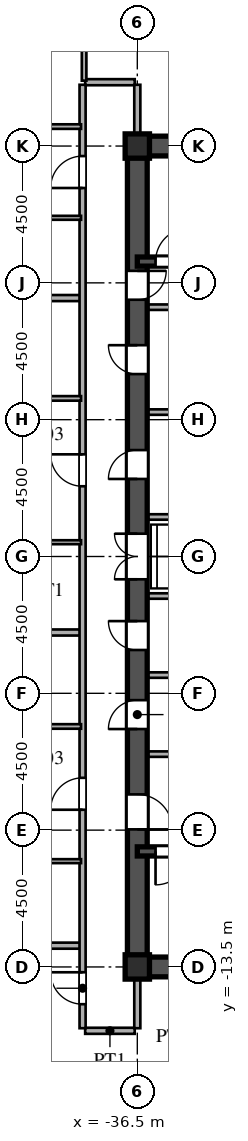
"""IFC4 building model, lengths in metres.
Left out: names, types, materials, properties, quantities, classifications, styles, units other than length and angle.
Written with IfcOpenShell. Run it as: python <this file> out.ifc"""

import sys

from ifc_helpers import new_model, si_unit, direction, frame, frame_2d, origin, origin_2d, place, context, subcontext, project, spatial, rectangle, i_section, extrude, source, transform, mapped, element, fill, save


model = new_model("IFC4")
c1 = context("Model", 3, precision=1e-05, world=origin(), true_north=direction((0.0, 1.0)))
c2 = subcontext(c1, "Body", "Model", "MODEL_VIEW")
j1 = project(units=[si_unit("LENGTHUNIT", "METRE"), si_unit("PLANEANGLEUNIT", "RADIAN")], contexts=[c1])
p1 = place(None, origin())
s1 = spatial("IfcSite", under=j1, at=p1, CompositionType="ELEMENT")
p2 = place(p1, origin())
s2 = spatial("IfcBuilding", under=s1, at=p2, CompositionType="ELEMENT")
p3 = place(p2, frame((0.0, 0.0, 96.0)))
s3 = spatial("IfcBuildingStorey", under=s2, at=p3, CompositionType="ELEMENT", Elevation=96.0)
m1 = source(origin(), c2, "Body", "SweptSolid", [
    extrude(i_section(OverallWidth=0.8, OverallDepth=0.8, WebThickness=0.032, FlangeThickness=0.05, at=origin_2d()), origin(), (0.0, 0.0, 1.0), 3.6),
])
for number, where, z_axis, x_axis in (
    (1, (-36.5, -13.5, 0.0), (0.0, 0.0, 1.0), (1.0, 0.0, 0.0)),
    (2, (-36.5, 13.5, 0.0), (0.0, 0.0, 1.0), (1.0, 0.0, 0.0)),
):
    element("IfcColumn", number, at=place(p3, frame(where, z_axis=z_axis, x_axis=x_axis)), inside=s3, PredefinedType="COLUMN", context=c2, shape_type="MappedRepresentation", body=[
        mapped(m1, transform((0.0, 0.0, 0.0), scale=1.0)),
    ])
for number, where, z_axis, x_axis in (
    (3, (-36.5, -13.5, 0.0), (0.0, 0.0, 1.0), (1.0, 0.0, 0.0)),
    (4, (-36.5, 13.5, 0.0), (0.0, 0.0, 1.0), (1.0, 0.0, 0.0)),
):
    element("IfcWall", number, at=place(p3, frame(where, z_axis=z_axis, x_axis=x_axis)), inside=s3, PredefinedType="SHEAR", context=c2, shape_type="SweptSolid", body=[
        extrude(rectangle(XDim=9.0, YDim=0.65, at=frame_2d((4.5, 0.0))), origin(), (0.0, 0.0, 1.0), 3.38),
    ])
p4 = place(p3, frame((-36.5, -13.65, 0.0), z_axis=(0.0, 0.0, 1.0), x_axis=(0.0, 1.0, 0.0)))
e5 = element("IfcWall", 5, at=p4, inside=s3, PredefinedType="SHEAR", context=c2, shape_type="SweptSolid", body=[
    extrude(rectangle(XDim=7.15, YDim=0.65, at=frame_2d((3.575, 0.0))), origin(), (0.0, 0.0, 1.0), 3.38),
])
p5 = place(p4, frame((4.675, 0.0, 0.0)))
e6 = element("IfcOpeningElement", 6, at=p5, cuts=e5, PredefinedType="OPENING", context=c2, shape_type="SweptSolid", body=[
    extrude(rectangle(XDim=1.15, YDim=2.2, at=frame_2d((0.575, 1.1))), frame((0.0, 0.335, 0.0), z_axis=(0.0, -1.0, 0.0), x_axis=(1.0, 0.0, 0.0)), (0.0, 0.0, 1.0), 0.67),
])
p6 = place(p3, frame((-36.5, -1.3, 0.0), z_axis=(0.0, 0.0, 1.0), x_axis=(0.0, 1.0, 0.0)))
e7 = element("IfcWall", 7, at=p6, inside=s3, PredefinedType="SHEAR", context=c2, shape_type="SweptSolid", body=[
    extrude(rectangle(XDim=2.6, YDim=0.65, at=frame_2d((1.3, 0.0))), origin(), (0.0, 0.0, 1.0), 3.38),
])
p7 = place(p6, frame((0.55, 0.0, 0.0)))
e8 = element("IfcOpeningElement", 8, at=p7, cuts=e7, PredefinedType="OPENING", context=c2, shape_type="SweptSolid", body=[
    extrude(rectangle(XDim=1.5, YDim=2.3, at=frame_2d((0.75, 1.15))), frame((0.0, 0.335, 0.0), z_axis=(0.0, -1.0, 0.0), x_axis=(1.0, 0.0, 0.0)), (0.0, 0.0, 1.0), 0.67),
])
p8 = place(p3, frame((-36.5, 8.2, 0.0), z_axis=(0.0, 0.0, 1.0), x_axis=(0.0, 1.0, 0.0)))
e9 = element("IfcWall", 9, at=p8, inside=s3, PredefinedType="SHEAR", context=c2, shape_type="SweptSolid", body=[
    extrude(rectangle(XDim=5.45, YDim=0.65, at=frame_2d((2.725, 0.0))), origin(), (0.0, 0.0, 1.0), 3.38),
])
p9 = place(p8, frame((0.245, 0.0, 0.0)))
e10 = element("IfcOpeningElement", 10, at=p9, cuts=e9, PredefinedType="OPENING", context=c2, shape_type="SweptSolid", body=[
    extrude(rectangle(XDim=0.95, YDim=2.15, at=frame_2d((0.475, 1.075))), frame((0.0, 0.335, 0.0), z_axis=(0.0, -1.0, 0.0), x_axis=(1.0, 0.0, 0.0)), (0.0, 0.0, 1.0), 0.67),
])
p10 = place(p3, frame((-36.5, -6.5, 0.0), z_axis=(0.0, 0.0, 1.0), x_axis=(0.0, 1.0, 0.0)))
e11 = element("IfcWall", 11, at=p10, inside=s3, PredefinedType="SHEAR", context=c2, shape_type="SweptSolid", body=[
    extrude(rectangle(XDim=2.6, YDim=0.65, at=frame_2d((1.3, 0.0))), origin(), (0.0, 0.0, 1.0), 3.38),
])
p11 = place(p10, frame((0.825, 0.0, 0.0)))
e12 = element("IfcOpeningElement", 12, at=p11, cuts=e11, PredefinedType="OPENING", context=c2, shape_type="SweptSolid", body=[
    extrude(rectangle(XDim=0.95, YDim=2.15, at=frame_2d((0.475, 1.075))), frame((0.0, 0.335, 0.0), z_axis=(0.0, -1.0, 0.0), x_axis=(1.0, 0.0, 0.0)), (0.0, 0.0, 1.0), 0.67),
])
p12 = place(p3, frame((-36.5, -3.9, 0.0), z_axis=(0.0, 0.0, 1.0), x_axis=(0.0, 1.0, 0.0)))
e13 = element("IfcWall", 13, at=p12, inside=s3, PredefinedType="SHEAR", context=c2, shape_type="SweptSolid", body=[
    extrude(rectangle(XDim=2.6, YDim=0.65, at=frame_2d((1.3, 0.0))), origin(), (0.0, 0.0, 1.0), 3.38),
])
p13 = place(p12, frame((0.825, 0.0, 0.0)))
e14 = element("IfcOpeningElement", 14, at=p13, cuts=e13, PredefinedType="OPENING", context=c2, shape_type="SweptSolid", body=[
    extrude(rectangle(XDim=0.95, YDim=2.15, at=frame_2d((0.475, 1.075))), frame((0.0, 0.335, 0.0), z_axis=(0.0, -1.0, 0.0), x_axis=(1.0, 0.0, 0.0)), (0.0, 0.0, 1.0), 0.67),
])
p14 = place(p3, frame((-36.5, 1.3, 0.0), z_axis=(0.0, 0.0, 1.0), x_axis=(0.0, 1.0, 0.0)))
e15 = element("IfcWall", 15, at=p14, inside=s3, PredefinedType="SHEAR", context=c2, shape_type="SweptSolid", body=[
    extrude(rectangle(XDim=3.45, YDim=0.65, at=frame_2d((1.725, 0.0))), origin(), (0.0, 0.0, 1.0), 3.38),
])
p15 = place(p14, frame((1.25, 0.0, 0.0)))
e16 = element("IfcOpeningElement", 16, at=p15, cuts=e15, PredefinedType="OPENING", context=c2, shape_type="SweptSolid", body=[
    extrude(rectangle(XDim=0.95, YDim=2.15, at=frame_2d((0.475, 1.075))), frame((0.0, 0.335, 0.0), z_axis=(0.0, -1.0, 0.0), x_axis=(1.0, 0.0, 0.0)), (0.0, 0.0, 1.0), 0.67),
])
p16 = place(p3, frame((-36.5, 4.75, 0.0), z_axis=(0.0, 0.0, 1.0), x_axis=(0.0, 1.0, 0.0)))
e17 = element("IfcWall", 17, at=p16, inside=s3, PredefinedType="SHEAR", context=c2, shape_type="SweptSolid", body=[
    extrude(rectangle(XDim=3.45, YDim=0.65, at=frame_2d((1.725, 0.0))), origin(), (0.0, 0.0, 1.0), 3.38),
])
p17 = place(p16, frame((1.25, 0.0, 0.0)))
e18 = element("IfcOpeningElement", 18, at=p17, cuts=e17, PredefinedType="OPENING", context=c2, shape_type="SweptSolid", body=[
    extrude(rectangle(XDim=0.95, YDim=2.15, at=frame_2d((0.475, 1.075))), frame((0.0, 0.335, 0.0), z_axis=(0.0, -1.0, 0.0), x_axis=(1.0, 0.0, 0.0)), (0.0, 0.0, 1.0), 0.67),
])
p18 = place(p3, frame((-36.5, -9.7, 0.0), z_axis=(0.0, 0.0, 1.0), x_axis=(1.0, 0.0, 0.0)))
e19 = element("IfcWall", 19, at=p18, inside=s3, PredefinedType="SHEAR", context=c2, shape_type="SweptSolid", body=[
    extrude(rectangle(XDim=9.0, YDim=0.3, at=frame_2d((4.5, 0.0))), origin(), (0.0, 0.0, 1.0), 3.38),
])
p19 = place(p18, frame((0.6, 0.0, 0.0)))
e20 = element("IfcOpeningElement", 20, at=p19, cuts=e19, PredefinedType="OPENING", context=c2, shape_type="SweptSolid", body=[
    extrude(rectangle(XDim=1.1, YDim=2.2, at=frame_2d((0.55, 1.1))), frame((0.0, 0.16, 0.0), z_axis=(0.0, -1.0, 0.0), x_axis=(1.0, 0.0, 0.0)), (0.0, 0.0, 1.0), 0.32),
])
p20 = place(p3, frame((-36.5, 9.7, 0.0), z_axis=(0.0, 0.0, 1.0), x_axis=(1.0, 0.0, 0.0)))
e21 = element("IfcWall", 21, at=p20, inside=s3, PredefinedType="SHEAR", context=c2, shape_type="SweptSolid", body=[
    extrude(rectangle(XDim=9.0, YDim=0.3, at=frame_2d((4.5, 0.0))), origin(), (0.0, 0.0, 1.0), 3.38),
])
p21 = place(p20, frame((0.6, 0.0, 0.0)))
e22 = element("IfcOpeningElement", 22, at=p21, cuts=e21, PredefinedType="OPENING", context=c2, shape_type="SweptSolid", body=[
    extrude(rectangle(XDim=1.1, YDim=2.2, at=frame_2d((0.55, 1.1))), frame((0.0, 0.16, 0.0), z_axis=(0.0, -1.0, 0.0), x_axis=(1.0, 0.0, 0.0)), (0.0, 0.0, 1.0), 0.32),
])
for number, where, z_axis, x_axis in (
    (23, (-36.15, -6.5, 0.0), (0.0, 0.0, 1.0), (1.0, 0.0, 0.0)),
    (24, (-36.15, 8.2, 0.0), (0.0, 0.0, 1.0), (1.0, 0.0, 0.0)),
):
    element("IfcWall", number, at=place(p3, frame(where, z_axis=z_axis, x_axis=x_axis)), inside=s3, PredefinedType="PARTITIONING", context=c2, shape_type="SweptSolid", body=[
        extrude(rectangle(XDim=5.7, YDim=0.18, at=frame_2d((2.85, 0.0))), origin(), (0.0, 0.0, 1.0), 3.38),
    ])
for number, where, z_axis, x_axis in (
    (25, (-36.15, -1.3, 0.0), (0.0, 0.0, 1.0), (1.0, 0.0, 0.0)),
    (26, (-36.15, 1.3, 0.0), (0.0, 0.0, 1.0), (1.0, 0.0, 0.0)),
    (27, (-36.15, -3.9, 0.0), (0.0, 0.0, 1.0), (1.0, 0.0, 0.0)),
    (28, (-36.15, 4.75, 0.0), (0.0, 0.0, 1.0), (1.0, 0.0, 0.0)),
):
    element("IfcWall", number, at=place(p3, frame(where, z_axis=z_axis, x_axis=x_axis)), inside=s3, PredefinedType="PARTITIONING", context=c2, shape_type="SweptSolid", body=[
        extrude(rectangle(XDim=2.95, YDim=0.18, at=frame_2d((1.475, 0.0))), origin(), (0.0, 0.0, 1.0), 3.38),
    ])
p22 = place(p3, frame((-38.215, -15.6, 0.0), z_axis=(0.0, 0.0, 1.0), x_axis=(1.0, 0.0, 0.0)))
e29 = element("IfcWall", 29, at=p22, inside=s3, PredefinedType="PARTITIONING", context=c2, shape_type="SweptSolid", body=[
    extrude(rectangle(XDim=1.63, YDim=0.2, at=frame_2d((0.815, 0.0))), origin(), (0.0, 0.0, 1.0), 3.38),
])
p23 = place(p3, frame((-59.234, -12.8, 0.0), z_axis=(0.0, 0.0, 1.0), x_axis=(1.0, 0.0, 0.0)))
e30 = element("IfcWall", 30, at=p23, inside=s3, PredefinedType="PARTITIONING", context=c2, shape_type="SweptSolid", body=[
    extrude(rectangle(XDim=20.854, YDim=0.2, at=frame_2d((10.427, 0.0))), origin(), (0.0, 0.0, 1.0), 3.38),
])
p24 = place(p3, frame((-44.1, -10.02, 0.0), z_axis=(0.0, 0.0, 1.0), x_axis=(1.0, 0.0, 0.0)))
e31 = element("IfcWall", 31, at=p24, inside=s3, PredefinedType="PARTITIONING", context=c2, shape_type="SweptSolid", body=[
    extrude(rectangle(XDim=5.75, YDim=0.13, at=frame_2d((2.875, 0.0))), origin(), (0.0, 0.0, 1.0), 3.38),
])
p25 = place(p24, frame((2.435, 0.0, 0.0)))
e32 = element("IfcOpeningElement", 32, at=p25, cuts=e31, PredefinedType="OPENING", context=c2, shape_type="SweptSolid", body=[
    extrude(rectangle(XDim=0.88, YDim=2.1, at=frame_2d((0.44, 1.05))), frame((0.0, 0.075, 0.0), z_axis=(0.0, -1.0, 0.0), x_axis=(1.0, 0.0, 0.0)), (0.0, 0.0, 1.0), 0.15),
])
p26 = place(p3, frame((-44.1, -5.59, 0.0), z_axis=(0.0, 0.0, 1.0), x_axis=(1.0, 0.0, 0.0)))
e33 = element("IfcWall", 33, at=p26, inside=s3, PredefinedType="PARTITIONING", context=c2, shape_type="SweptSolid", body=[
    extrude(rectangle(XDim=5.75, YDim=0.15, at=frame_2d((2.875, 0.0))), origin(), (0.0, 0.0, 1.0), 3.38),
])
p27 = place(p26, frame((2.4, 0.0, 0.0)))
e34 = element("IfcOpeningElement", 34, at=p27, cuts=e33, PredefinedType="OPENING", context=c2, shape_type="SweptSolid", body=[
    extrude(rectangle(XDim=0.95, YDim=2.15, at=frame_2d((0.475, 1.075))), frame((0.0, 0.085, 0.0), z_axis=(0.0, -1.0, 0.0), x_axis=(1.0, 0.0, 0.0)), (0.0, 0.0, 1.0), 0.17),
])
p28 = place(p3, frame((-71.005, -2.5, 0.0), z_axis=(0.0, 0.0, 1.0), x_axis=(1.0, 0.0, 0.0)))
e35 = element("IfcWall", 35, at=p28, inside=s3, PredefinedType="PARTITIONING", context=c2, shape_type="SweptSolid", body=[
    extrude(rectangle(XDim=32.625, YDim=0.2, at=frame_2d((16.312, 0.0))), origin(), (0.0, 0.0, 1.0), 3.38),
])
p29 = place(p3, frame((-44.1, 0.47, 0.0), z_axis=(0.0, 0.0, 1.0), x_axis=(1.0, 0.0, 0.0)))
e36 = element("IfcWall", 36, at=p29, inside=s3, PredefinedType="PARTITIONING", context=c2, shape_type="SweptSolid", body=[
    extrude(rectangle(XDim=5.75, YDim=0.13, at=frame_2d((2.875, 0.0))), origin(), (0.0, 0.0, 1.0), 3.38),
])
p30 = place(p29, frame((2.435, 0.0, 0.0)))
e37 = element("IfcOpeningElement", 37, at=p30, cuts=e36, PredefinedType="OPENING", context=c2, shape_type="SweptSolid", body=[
    extrude(rectangle(XDim=0.88, YDim=2.1, at=frame_2d((0.44, 1.05))), frame((0.0, 0.075, 0.0), z_axis=(0.0, -1.0, 0.0), x_axis=(1.0, 0.0, 0.0)), (0.0, 0.0, 1.0), 0.15),
])
p31 = place(p3, frame((-44.1, 5.2, 0.0), z_axis=(0.0, 0.0, 1.0), x_axis=(1.0, 0.0, 0.0)))
e38 = element("IfcWall", 38, at=p31, inside=s3, PredefinedType="PARTITIONING", context=c2, shape_type="SweptSolid", body=[
    extrude(rectangle(XDim=5.75, YDim=0.15, at=frame_2d((2.875, 0.0))), origin(), (0.0, 0.0, 1.0), 3.38),
])
p32 = place(p31, frame((2.4, 0.0, 0.0)))
e39 = element("IfcOpeningElement", 39, at=p32, cuts=e38, PredefinedType="OPENING", context=c2, shape_type="SweptSolid", body=[
    extrude(rectangle(XDim=0.95, YDim=2.15, at=frame_2d((0.475, 1.075))), frame((0.0, 0.085, 0.0), z_axis=(0.0, -1.0, 0.0), x_axis=(1.0, 0.0, 0.0)), (0.0, 0.0, 1.0), 0.17),
])
p33 = place(p3, frame((-68.79, 8.5, 0.0), z_axis=(0.0, 0.0, 1.0), x_axis=(1.0, 0.0, 0.0)))
e40 = element("IfcWall", 40, at=p33, inside=s3, PredefinedType="PARTITIONING", context=c2, shape_type="SweptSolid", body=[
    extrude(rectangle(XDim=30.41, YDim=0.2, at=frame_2d((15.205, 0.0))), origin(), (0.0, 0.0, 1.0), 3.38),
])
p34 = place(p3, frame((-44.1, 11.14, 0.0), z_axis=(0.0, 0.0, 1.0), x_axis=(1.0, 0.0, 0.0)))
e41 = element("IfcWall", 41, at=p34, inside=s3, PredefinedType="PARTITIONING", context=c2, shape_type="SweptSolid", body=[
    extrude(rectangle(XDim=5.75, YDim=0.13, at=frame_2d((2.875, 0.0))), origin(), (0.0, 0.0, 1.0), 3.38),
])
p35 = place(p34, frame((2.435, 0.0, 0.0)))
e42 = element("IfcOpeningElement", 42, at=p35, cuts=e41, PredefinedType="OPENING", context=c2, shape_type="SweptSolid", body=[
    extrude(rectangle(XDim=0.88, YDim=2.1, at=frame_2d((0.44, 1.05))), frame((0.0, 0.075, 0.0), z_axis=(0.0, -1.0, 0.0), x_axis=(1.0, 0.0, 0.0)), (0.0, 0.0, 1.0), 0.15),
])
p36 = place(p3, frame((-44.1, 14.14, 0.0), z_axis=(0.0, 0.0, 1.0), x_axis=(1.0, 0.0, 0.0)))
e43 = element("IfcWall", 43, at=p36, inside=s3, PredefinedType="PARTITIONING", context=c2, shape_type="SweptSolid", body=[
    extrude(rectangle(XDim=5.75, YDim=0.15, at=frame_2d((2.875, 0.0))), origin(), (0.0, 0.0, 1.0), 3.38),
])
p37 = place(p36, frame((2.4, 0.0, 0.0)))
e44 = element("IfcOpeningElement", 44, at=p37, cuts=e43, PredefinedType="OPENING", context=c2, shape_type="SweptSolid", body=[
    extrude(rectangle(XDim=0.95, YDim=2.15, at=frame_2d((0.475, 1.075))), frame((0.0, 0.085, 0.0), z_axis=(0.0, -1.0, 0.0), x_axis=(1.0, 0.0, 0.0)), (0.0, 0.0, 1.0), 0.17),
])
p38 = place(p3, frame((-38.215, 15.6, 0.0), z_axis=(0.0, 0.0, 1.0), x_axis=(1.0, 0.0, 0.0)))
e45 = element("IfcWall", 45, at=p38, inside=s3, PredefinedType="PARTITIONING", context=c2, shape_type="SweptSolid", body=[
    extrude(rectangle(XDim=1.63, YDim=0.2, at=frame_2d((0.815, 0.0))), origin(), (0.0, 0.0, 1.0), 3.38),
])
p39 = place(p3, frame((-38.3, -15.515, 0.0), z_axis=(0.0, 0.0, 1.0), x_axis=(0.0, 1.0, 0.0)))
e46 = element("IfcWall", 46, at=p39, inside=s3, PredefinedType="PARTITIONING", context=c2, shape_type="SweptSolid", body=[
    extrude(rectangle(XDim=31.03, YDim=0.2, at=frame_2d((15.515, 0.0))), origin(), (0.0, 0.0, 1.0), 3.38),
])
p40 = place(p39, frame((0.79, 0.0, 0.0)))
e47 = element("IfcOpeningElement", 47, at=p40, cuts=e46, PredefinedType="OPENING", context=c2, shape_type="SweptSolid", body=[
    extrude(rectangle(XDim=1.05, YDim=2.25, at=frame_2d((0.525, 1.125))), frame((0.0, 0.11, 0.0), z_axis=(0.0, -1.0, 0.0), x_axis=(1.0, 0.0, 0.0)), (0.0, 0.0, 1.0), 0.22),
])
p41 = place(p39, frame((7.186, 0.0, 0.0)))
e48 = element("IfcOpeningElement", 48, at=p41, cuts=e46, PredefinedType="OPENING", context=c2, shape_type="SweptSolid", body=[
    extrude(rectangle(XDim=1.05, YDim=2.25, at=frame_2d((0.525, 1.125))), frame((0.0, 0.11, 0.0), z_axis=(0.0, -1.0, 0.0), x_axis=(1.0, 0.0, 0.0)), (0.0, 0.0, 1.0), 0.22),
])
p42 = place(p39, frame((17.825, 0.0, 0.0)))
e49 = element("IfcOpeningElement", 49, at=p42, cuts=e46, PredefinedType="OPENING", context=c2, shape_type="SweptSolid", body=[
    extrude(rectangle(XDim=1.05, YDim=2.25, at=frame_2d((0.525, 1.125))), frame((0.0, 0.11, 0.0), z_axis=(0.0, -1.0, 0.0), x_axis=(1.0, 0.0, 0.0)), (0.0, 0.0, 1.0), 0.22),
])
p43 = place(p39, frame((27.635, 0.0, 0.0)))
e50 = element("IfcOpeningElement", 50, at=p43, cuts=e46, PredefinedType="OPENING", context=c2, shape_type="SweptSolid", body=[
    extrude(rectangle(XDim=1.05, YDim=2.25, at=frame_2d((0.525, 1.125))), frame((0.0, 0.11, 0.0), z_axis=(0.0, -1.0, 0.0), x_axis=(1.0, 0.0, 0.0)), (0.0, 0.0, 1.0), 0.22),
])
p44 = place(p3, frame((-38.25, 15.65, 0.0), z_axis=(0.0, 0.0, 1.0), x_axis=(0.0, 1.0, 0.0)))
e51 = element("IfcWall", 51, at=p44, inside=s3, PredefinedType="PARTITIONING", context=c2, shape_type="SweptSolid", body=[
    extrude(rectangle(XDim=6.623, YDim=0.15, at=frame_2d((3.312, 0.0))), origin(), (0.0, 0.0, 1.0), 3.38),
])
p45 = place(p44, frame((1.425, 0.0, 0.0)))
e52 = element("IfcOpeningElement", 52, at=p45, cuts=e51, PredefinedType="OPENING", context=c2, shape_type="SweptSolid", body=[
    extrude(rectangle(XDim=0.95, YDim=2.15, at=frame_2d((0.475, 1.075))), frame((0.0, 0.085, 0.0), z_axis=(0.0, -1.0, 0.0), x_axis=(1.0, 0.0, 0.0)), (0.0, 0.0, 1.0), 0.17),
])
for number, where, z_axis, x_axis in (
    (53, (-36.5, -15.515, 0.0), (0.0, 0.0, 1.0), (0.0, 1.0, 0.0)),
    (54, (-36.5, 13.83, 0.0), (0.0, 0.0, 1.0), (0.0, 1.0, 0.0)),
):
    element("IfcWall", number, at=place(p3, frame(where, z_axis=z_axis, x_axis=x_axis)), inside=s3, PredefinedType="PARTITIONING", context=c2, shape_type="SweptSolid", body=[
        extrude(rectangle(XDim=1.685, YDim=0.2, at=frame_2d((0.842, 0.0))), origin(), (0.0, 0.0, 1.0), 2.68),
    ])
m2 = source(origin(), c2, "Body", "SweptSolid", [
    extrude(rectangle(XDim=1.15, YDim=2.2, at=frame_2d((0.575, 1.1))), frame((0.0, 0.025, 0.0), z_axis=(0.0, -1.0, 0.0), x_axis=(1.0, 0.0, 0.0)), (0.0, 0.0, 1.0), 0.05),
])
p46 = place(p5, frame((1.15, 0.0, 0.0), z_axis=(0.0, 0.0, 1.0), x_axis=(-1.0, 0.0, 0.0)))
e55 = element("IfcDoor", 55, at=p46, inside=s3, OperationType="SINGLE_SWING_LEFT", PredefinedType="DOOR", context=c2, shape_type="MappedRepresentation", body=[
    mapped(m2, transform((0.0, 0.0, 0.0), scale=1.0)),
])
fill(e6, e55)
m3 = source(origin(), c2, "Body", "SweptSolid", [
    extrude(rectangle(XDim=1.5, YDim=2.3, at=frame_2d((0.75, 1.15))), frame((0.0, 0.025, 0.0), z_axis=(0.0, -1.0, 0.0), x_axis=(1.0, 0.0, 0.0)), (0.0, 0.0, 1.0), 0.05),
])
p47 = place(p7, origin())
e56 = element("IfcDoor", 56, at=p47, inside=s3, OperationType="DOUBLE_SWING_LEFT", PredefinedType="DOOR", context=c2, shape_type="MappedRepresentation", body=[
    mapped(m3, transform((0.0, 0.0, 0.0), scale=1.0)),
])
fill(e8, e56)
m4 = source(origin(), c2, "Body", "SweptSolid", [
    extrude(rectangle(XDim=0.95, YDim=2.15, at=frame_2d((0.475, 1.075))), frame((0.0, 0.025, 0.0), z_axis=(0.0, -1.0, 0.0), x_axis=(1.0, 0.0, 0.0)), (0.0, 0.0, 1.0), 0.05),
])
p48 = place(p9, frame((0.95, 0.0, 0.0), z_axis=(0.0, 0.0, 1.0), x_axis=(-1.0, 0.0, 0.0)))
e57 = element("IfcDoor", 57, at=p48, inside=s3, OperationType="SINGLE_SWING_RIGHT", PredefinedType="DOOR", context=c2, shape_type="MappedRepresentation", body=[
    mapped(m4, transform((0.0, 0.0, 0.0), scale=1.0)),
])
fill(e10, e57)
p49 = place(p11, origin())
e58 = element("IfcDoor", 58, at=p49, inside=s3, OperationType="SINGLE_SWING_LEFT", PredefinedType="DOOR", context=c2, shape_type="MappedRepresentation", body=[
    mapped(m4, transform((0.0, 0.0, 0.0), scale=1.0)),
])
fill(e12, e58)
p50 = place(p13, origin())
e59 = element("IfcDoor", 59, at=p50, inside=s3, OperationType="SINGLE_SWING_RIGHT", PredefinedType="DOOR", context=c2, shape_type="MappedRepresentation", body=[
    mapped(m4, transform((0.0, 0.0, 0.0), scale=1.0)),
])
fill(e14, e59)
p51 = place(p15, origin())
e60 = element("IfcDoor", 60, at=p51, inside=s3, OperationType="SINGLE_SWING_LEFT", PredefinedType="DOOR", context=c2, shape_type="MappedRepresentation", body=[
    mapped(m4, transform((0.0, 0.0, 0.0), scale=1.0)),
])
fill(e16, e60)
p52 = place(p17, origin())
e61 = element("IfcDoor", 61, at=p52, inside=s3, OperationType="SINGLE_SWING_RIGHT", PredefinedType="DOOR", context=c2, shape_type="MappedRepresentation", body=[
    mapped(m4, transform((0.0, 0.0, 0.0), scale=1.0)),
])
fill(e18, e61)
m5 = source(origin(), c2, "Body", "SweptSolid", [
    extrude(rectangle(XDim=1.1, YDim=2.2, at=frame_2d((0.55, 1.1))), frame((0.0, 0.025, 0.0), z_axis=(0.0, -1.0, 0.0), x_axis=(1.0, 0.0, 0.0)), (0.0, 0.0, 1.0), 0.05),
])
p53 = place(p19, frame((1.1, 0.0, 0.0), z_axis=(0.0, 0.0, 1.0), x_axis=(-1.0, 0.0, 0.0)))
e62 = element("IfcDoor", 62, at=p53, inside=s3, OperationType="SINGLE_SWING_LEFT", PredefinedType="DOOR", context=c2, shape_type="MappedRepresentation", body=[
    mapped(m5, transform((0.0, 0.0, 0.0), scale=1.0)),
])
fill(e20, e62)
p54 = place(p21, origin())
e63 = element("IfcDoor", 63, at=p54, inside=s3, OperationType="SINGLE_SWING_RIGHT", PredefinedType="DOOR", context=c2, shape_type="MappedRepresentation", body=[
    mapped(m5, transform((0.0, 0.0, 0.0), scale=1.0)),
])
fill(e22, e63)
m6 = source(origin(), c2, "Body", "SweptSolid", [
    extrude(rectangle(XDim=1.05, YDim=2.25, at=frame_2d((0.525, 1.125))), frame((0.0, 0.025, 0.0), z_axis=(0.0, -1.0, 0.0), x_axis=(1.0, 0.0, 0.0)), (0.0, 0.0, 1.0), 0.05),
])
p55 = place(p40, origin())
e64 = element("IfcDoor", 64, at=p55, inside=s3, OperationType="SINGLE_SWING_RIGHT", PredefinedType="DOOR", context=c2, shape_type="MappedRepresentation", body=[
    mapped(m6, transform((0.0, 0.0, 0.0), scale=1.0)),
])
fill(e47, e64)
p56 = place(p41, origin())
e65 = element("IfcDoor", 65, at=p56, inside=s3, OperationType="SINGLE_SWING_LEFT", PredefinedType="DOOR", context=c2, shape_type="MappedRepresentation", body=[
    mapped(m6, transform((0.0, 0.0, 0.0), scale=1.0)),
])
fill(e48, e65)
p57 = place(p42, origin())
e66 = element("IfcDoor", 66, at=p57, inside=s3, OperationType="SINGLE_SWING_RIGHT", PredefinedType="DOOR", context=c2, shape_type="MappedRepresentation", body=[
    mapped(m6, transform((0.0, 0.0, 0.0), scale=1.0)),
])
fill(e49, e66)
p58 = place(p43, origin())
e67 = element("IfcDoor", 67, at=p58, inside=s3, OperationType="SINGLE_SWING_LEFT", PredefinedType="DOOR", context=c2, shape_type="MappedRepresentation", body=[
    mapped(m6, transform((0.0, 0.0, 0.0), scale=1.0)),
])
fill(e50, e67)
save(model, sys.argv[1])
